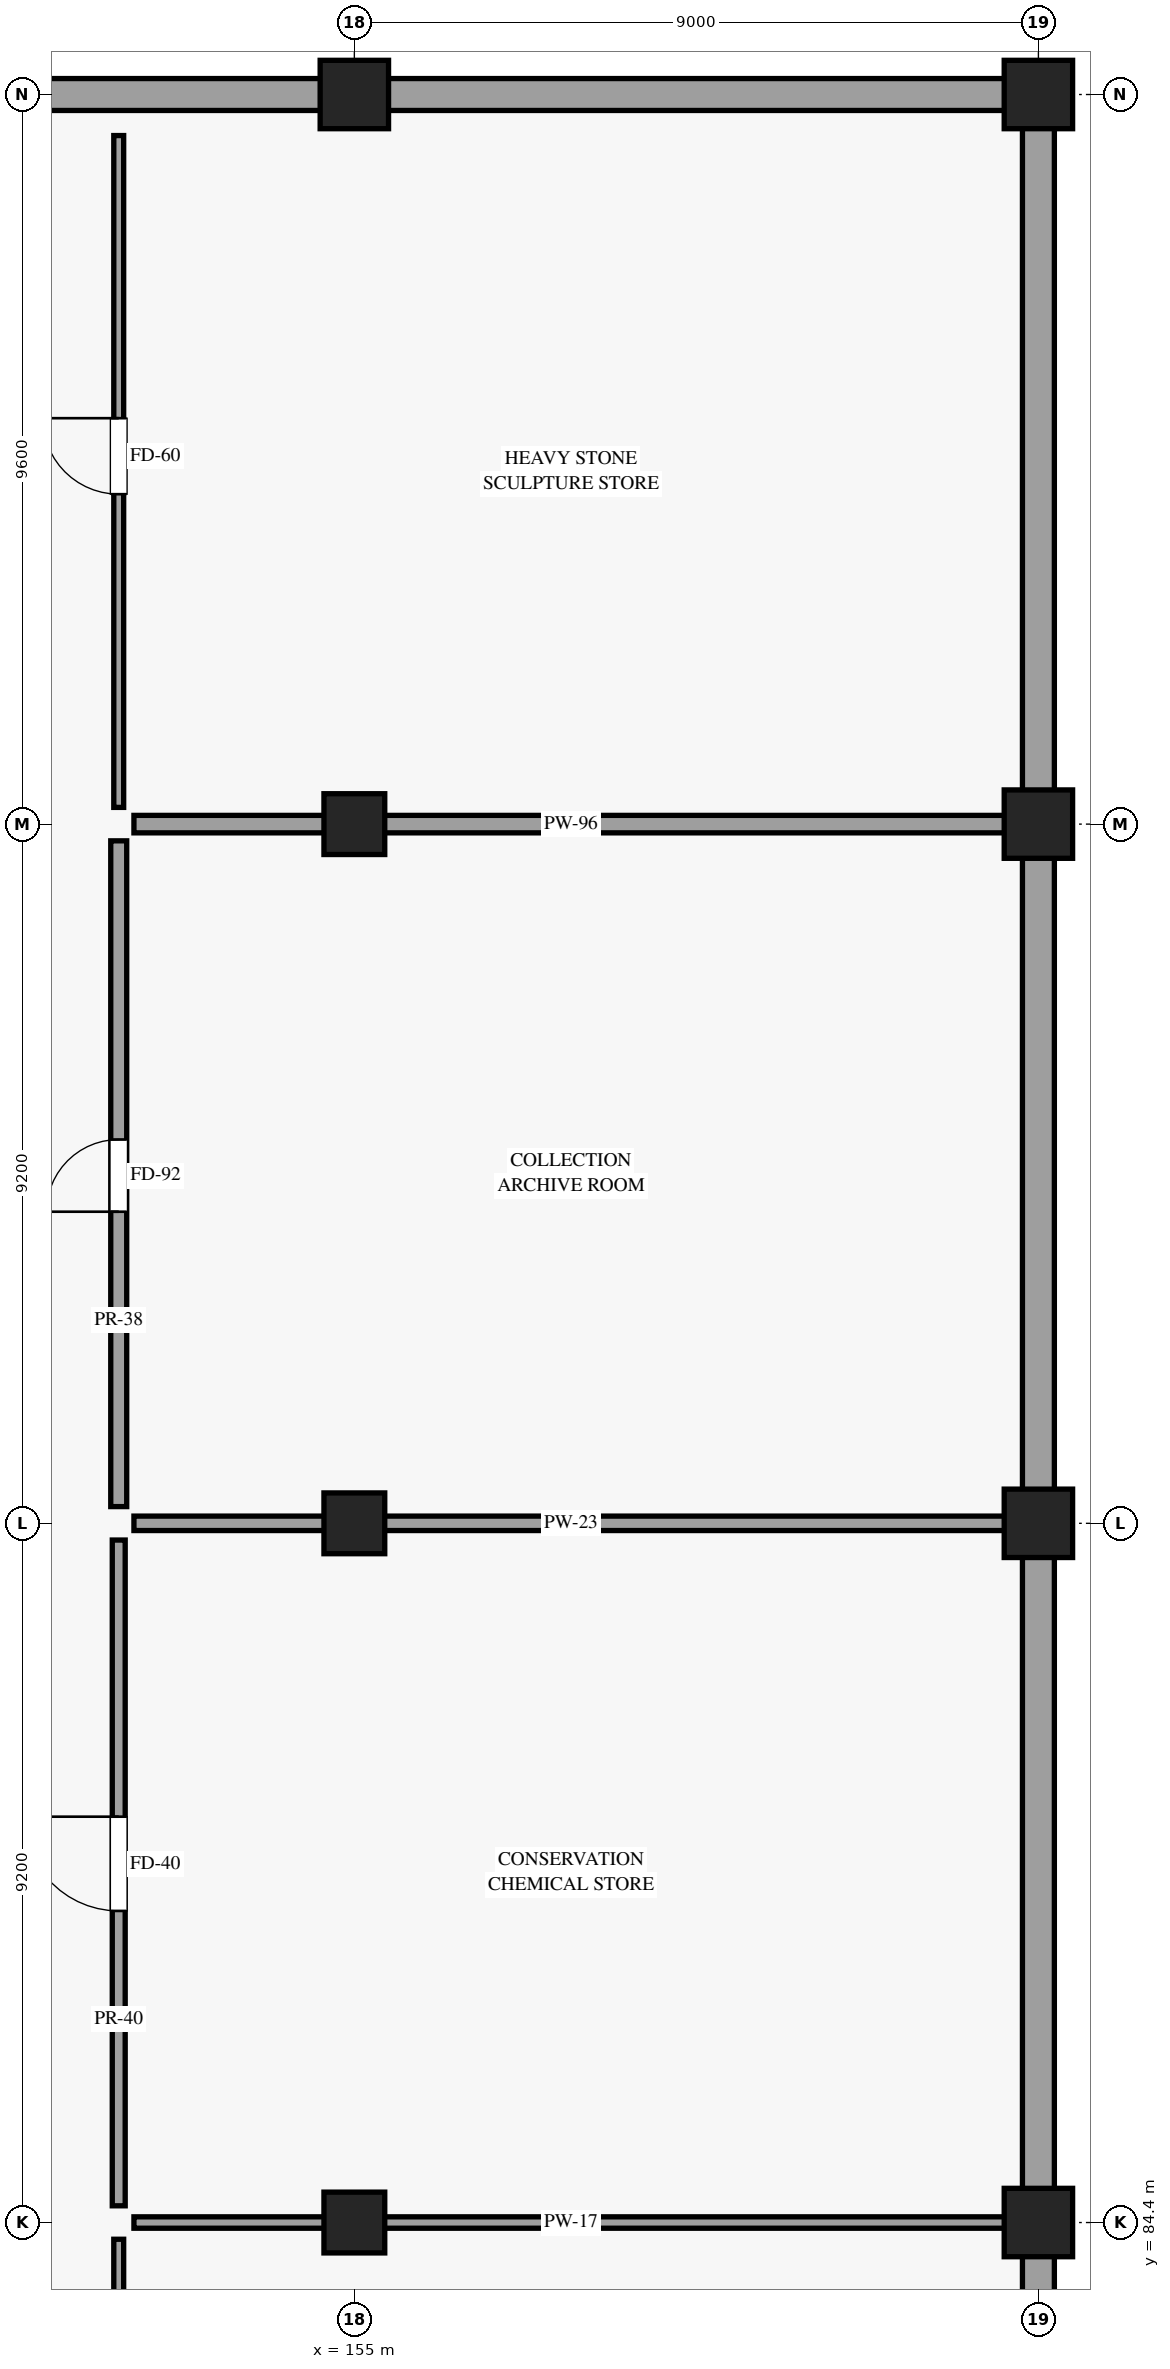
"""IFC4 building model, lengths in metres.
Left out: names, types, materials, properties, quantities, classifications, styles, units other than length and angle.
Written with IfcOpenShell. Run it as: python <this file> out.ifc"""

import sys

from ifc_helpers import new_model, si_unit, direction, frame, frame_2d, origin, origin_2d, place, context, subcontext, project, spatial, rectangle, extrude, element, fill, save


model = new_model("IFC4")
c1 = context("Model", 3, precision=1e-05, world=origin(), true_north=direction((0.0, 1.0)))
c2 = subcontext(c1, "Body", "Model", "MODEL_VIEW")
j1 = project(units=[si_unit("LENGTHUNIT", "METRE"), si_unit("PLANEANGLEUNIT", "RADIAN")], contexts=[c1])
p1 = place(None, origin())
s1 = spatial("IfcSite", under=j1, at=p1, CompositionType="ELEMENT")
p2 = place(p1, origin())
s2 = spatial("IfcBuilding", under=s1, at=p2, CompositionType="ELEMENT")
p3 = place(p2, frame((0.0, 0.0, -4.8)))
s3 = spatial("IfcBuildingStorey", under=s2, at=p3, CompositionType="ELEMENT", Elevation=-4.8)
for number, where, z_axis, x_axis in (
    (1, (155.0, 84.4, 0.0), (0.0, 0.0, 1.0), (1.0, 0.0, 0.0)),
    (2, (155.0, 93.6, 0.0), (0.0, 0.0, 1.0), (1.0, 0.0, 0.0)),
    (3, (155.0, 102.8, 0.0), (0.0, 0.0, 1.0), (1.0, 0.0, 0.0)),
):
    element("IfcColumn", number, at=place(p3, frame(where, z_axis=z_axis, x_axis=x_axis)), inside=s3, PredefinedType="COLUMN", context=c2, shape_type="SweptSolid", body=[
        extrude(rectangle(XDim=0.8, YDim=0.8, at=origin_2d()), origin(), (0.0, 0.0, 1.0), 4.8),
    ])
for number, where, z_axis, x_axis in (
    (4, (155.0, 112.4, 0.0), (0.0, 0.0, 1.0), (1.0, 0.0, 0.0)),
    (5, (164.0, 84.4, 0.0), (0.0, 0.0, 1.0), (1.0, 0.0, 0.0)),
    (6, (164.0, 93.6, 0.0), (0.0, 0.0, 1.0), (1.0, 0.0, 0.0)),
    (7, (164.0, 102.8, 0.0), (0.0, 0.0, 1.0), (1.0, 0.0, 0.0)),
    (8, (164.0, 112.4, 0.0), (0.0, 0.0, 1.0), (1.0, 0.0, 0.0)),
):
    element("IfcColumn", number, at=place(p3, frame(where, z_axis=z_axis, x_axis=x_axis)), inside=s3, PredefinedType="COLUMN", context=c2, shape_type="SweptSolid", body=[
        extrude(rectangle(XDim=0.9, YDim=0.9, at=origin_2d()), origin(), (0.0, 0.0, 1.0), 4.8),
    ])
p4 = place(p3, frame((136.79, 112.4, 0.0), z_axis=(0.0, 0.0, 1.0), x_axis=(1.0, 0.0, 0.0)))
e9 = element("IfcWall", 9, at=p4, inside=s3, PredefinedType="SOLIDWALL", context=c2, shape_type="SweptSolid", body=[
    extrude(rectangle(XDim=27.42, YDim=0.42, at=frame_2d((13.71, 0.0))), origin(), (0.0, 0.0, 1.0), 3.415),
])
p5 = place(p3, frame((164.0, 75.2, 0.0), z_axis=(0.0, 0.0, 1.0), x_axis=(0.0, 1.0, 0.0)))
e10 = element("IfcWall", 10, at=p5, inside=s3, PredefinedType="SOLIDWALL", context=c2, shape_type="SweptSolid", body=[
    extrude(rectangle(XDim=37.2, YDim=0.42, at=frame_2d((18.6, 0.0))), origin(), (0.0, 0.0, 1.0), 3.415),
])
p6 = place(p3, frame((151.9, 75.74, 0.0), z_axis=(0.0, 0.0, 1.0), x_axis=(0.0, 1.0, 0.0)))
e11 = element("IfcWall", 11, at=p6, inside=s3, PredefinedType="PARTITIONING", context=c2, shape_type="SweptSolid", body=[
    extrude(rectangle(XDim=8.44, YDim=0.13, at=frame_2d((4.22, 0.0))), origin(), (0.0, 0.0, 1.0), 3.415),
])
p7 = place(p6, frame((3.519, 0.0, 0.0)))
e12 = element("IfcOpeningElement", 12, at=p7, cuts=e11, PredefinedType="OPENING", context=c2, shape_type="SweptSolid", body=[
    extrude(rectangle(XDim=1.16, YDim=2.28, at=frame_2d((0.58, 1.14))), frame((0.0, 0.075, 0.0), z_axis=(0.0, -1.0, 0.0), x_axis=(1.0, 0.0, 0.0)), (0.0, 0.0, 1.0), 0.15),
])
p8 = place(p3, frame((152.1, 84.4, 0.0), z_axis=(0.0, 0.0, 1.0), x_axis=(1.0, 0.0, 0.0)))
e13 = element("IfcWall", 13, at=p8, inside=s3, PredefinedType="PARTITIONING", context=c2, shape_type="SweptSolid", body=[
    extrude(rectangle(XDim=11.5, YDim=0.15, at=frame_2d((5.75, 0.0))), origin(), (0.0, 0.0, 1.0), 3.415),
])
p9 = place(p3, frame((151.9, 84.62, 0.0), z_axis=(0.0, 0.0, 1.0), x_axis=(0.0, 1.0, 0.0)))
e14 = element("IfcWall", 14, at=p9, inside=s3, PredefinedType="PARTITIONING", context=c2, shape_type="SweptSolid", body=[
    extrude(rectangle(XDim=8.76, YDim=0.17, at=frame_2d((4.38, 0.0))), origin(), (0.0, 0.0, 1.0), 3.415),
])
p10 = place(p9, frame((3.88, 0.0, 0.0)))
e15 = element("IfcOpeningElement", 15, at=p10, cuts=e14, PredefinedType="OPENING", context=c2, shape_type="SweptSolid", body=[
    extrude(rectangle(XDim=1.24, YDim=2.32, at=frame_2d((0.62, 1.16))), frame((0.0, 0.095, 0.0), z_axis=(0.0, -1.0, 0.0), x_axis=(1.0, 0.0, 0.0)), (0.0, 0.0, 1.0), 0.19),
])
p11 = place(p3, frame((152.1, 93.6, 0.0), z_axis=(0.0, 0.0, 1.0), x_axis=(1.0, 0.0, 0.0)))
e16 = element("IfcWall", 16, at=p11, inside=s3, PredefinedType="PARTITIONING", context=c2, shape_type="SweptSolid", body=[
    extrude(rectangle(XDim=11.5, YDim=0.19, at=frame_2d((5.75, 0.0))), origin(), (0.0, 0.0, 1.0), 3.415),
])
p12 = place(p3, frame((151.9, 93.82, 0.0), z_axis=(0.0, 0.0, 1.0), x_axis=(0.0, 1.0, 0.0)))
e17 = element("IfcWall", 17, at=p12, inside=s3, PredefinedType="PARTITIONING", context=c2, shape_type="SweptSolid", body=[
    extrude(rectangle(XDim=8.76, YDim=0.21, at=frame_2d((4.38, 0.0))), origin(), (0.0, 0.0, 1.0), 3.415),
])
p13 = place(p12, frame((3.88, 0.0, 0.0)))
e18 = element("IfcOpeningElement", 18, at=p13, cuts=e17, PredefinedType="OPENING", context=c2, shape_type="SweptSolid", body=[
    extrude(rectangle(XDim=0.95, YDim=2.15, at=frame_2d((0.475, 1.075))), frame((0.0, 0.115, 0.0), z_axis=(0.0, -1.0, 0.0), x_axis=(1.0, 0.0, 0.0)), (0.0, 0.0, 1.0), 0.23),
])
p14 = place(p3, frame((152.1, 102.8, 0.0), z_axis=(0.0, 0.0, 1.0), x_axis=(1.0, 0.0, 0.0)))
e19 = element("IfcWall", 19, at=p14, inside=s3, PredefinedType="PARTITIONING", context=c2, shape_type="SweptSolid", body=[
    extrude(rectangle(XDim=11.5, YDim=0.23, at=frame_2d((5.75, 0.0))), origin(), (0.0, 0.0, 1.0), 3.415),
])
p15 = place(p3, frame((151.9, 103.02, 0.0), z_axis=(0.0, 0.0, 1.0), x_axis=(0.0, 1.0, 0.0)))
e20 = element("IfcWall", 20, at=p15, inside=s3, PredefinedType="PARTITIONING", context=c2, shape_type="SweptSolid", body=[
    extrude(rectangle(XDim=8.84, YDim=0.13, at=frame_2d((4.42, 0.0))), origin(), (0.0, 0.0, 1.0), 3.415),
])
p16 = place(p15, frame((4.121, 0.0, 0.0)))
e21 = element("IfcOpeningElement", 21, at=p16, cuts=e20, PredefinedType="OPENING", context=c2, shape_type="SweptSolid", body=[
    extrude(rectangle(XDim=1.0, YDim=2.2, at=frame_2d((0.5, 1.1))), frame((0.0, 0.075, 0.0), z_axis=(0.0, -1.0, 0.0), x_axis=(1.0, 0.0, 0.0)), (0.0, 0.0, 1.0), 0.15),
])
p17 = place(p10, origin())
e22 = element("IfcDoor", 22, at=p17, inside=s3, OperationType="SINGLE_SWING_RIGHT", PredefinedType="DOOR", context=c2, shape_type="SweptSolid", body=[
    extrude(rectangle(XDim=1.24, YDim=2.32, at=frame_2d((0.62, 1.16))), frame((0.0, 0.025, 0.0), z_axis=(0.0, -1.0, 0.0), x_axis=(1.0, 0.0, 0.0)), (0.0, 0.0, 1.0), 0.05),
])
fill(e15, e22)
p18 = place(p13, origin())
e23 = element("IfcDoor", 23, at=p18, inside=s3, OperationType="SINGLE_SWING_LEFT", PredefinedType="DOOR", context=c2, shape_type="SweptSolid", body=[
    extrude(rectangle(XDim=0.95, YDim=2.15, at=frame_2d((0.475, 1.075))), frame((0.0, 0.025, 0.0), z_axis=(0.0, -1.0, 0.0), x_axis=(1.0, 0.0, 0.0)), (0.0, 0.0, 1.0), 0.05),
])
fill(e18, e23)
p19 = place(p16, origin())
e24 = element("IfcDoor", 24, at=p19, inside=s3, OperationType="SINGLE_SWING_RIGHT", PredefinedType="DOOR", context=c2, shape_type="SweptSolid", body=[
    extrude(rectangle(XDim=1.0, YDim=2.2, at=frame_2d((0.5, 1.1))), frame((0.0, 0.025, 0.0), z_axis=(0.0, -1.0, 0.0), x_axis=(1.0, 0.0, 0.0)), (0.0, 0.0, 1.0), 0.05),
])
fill(e21, e24)
save(model, sys.argv[1])
